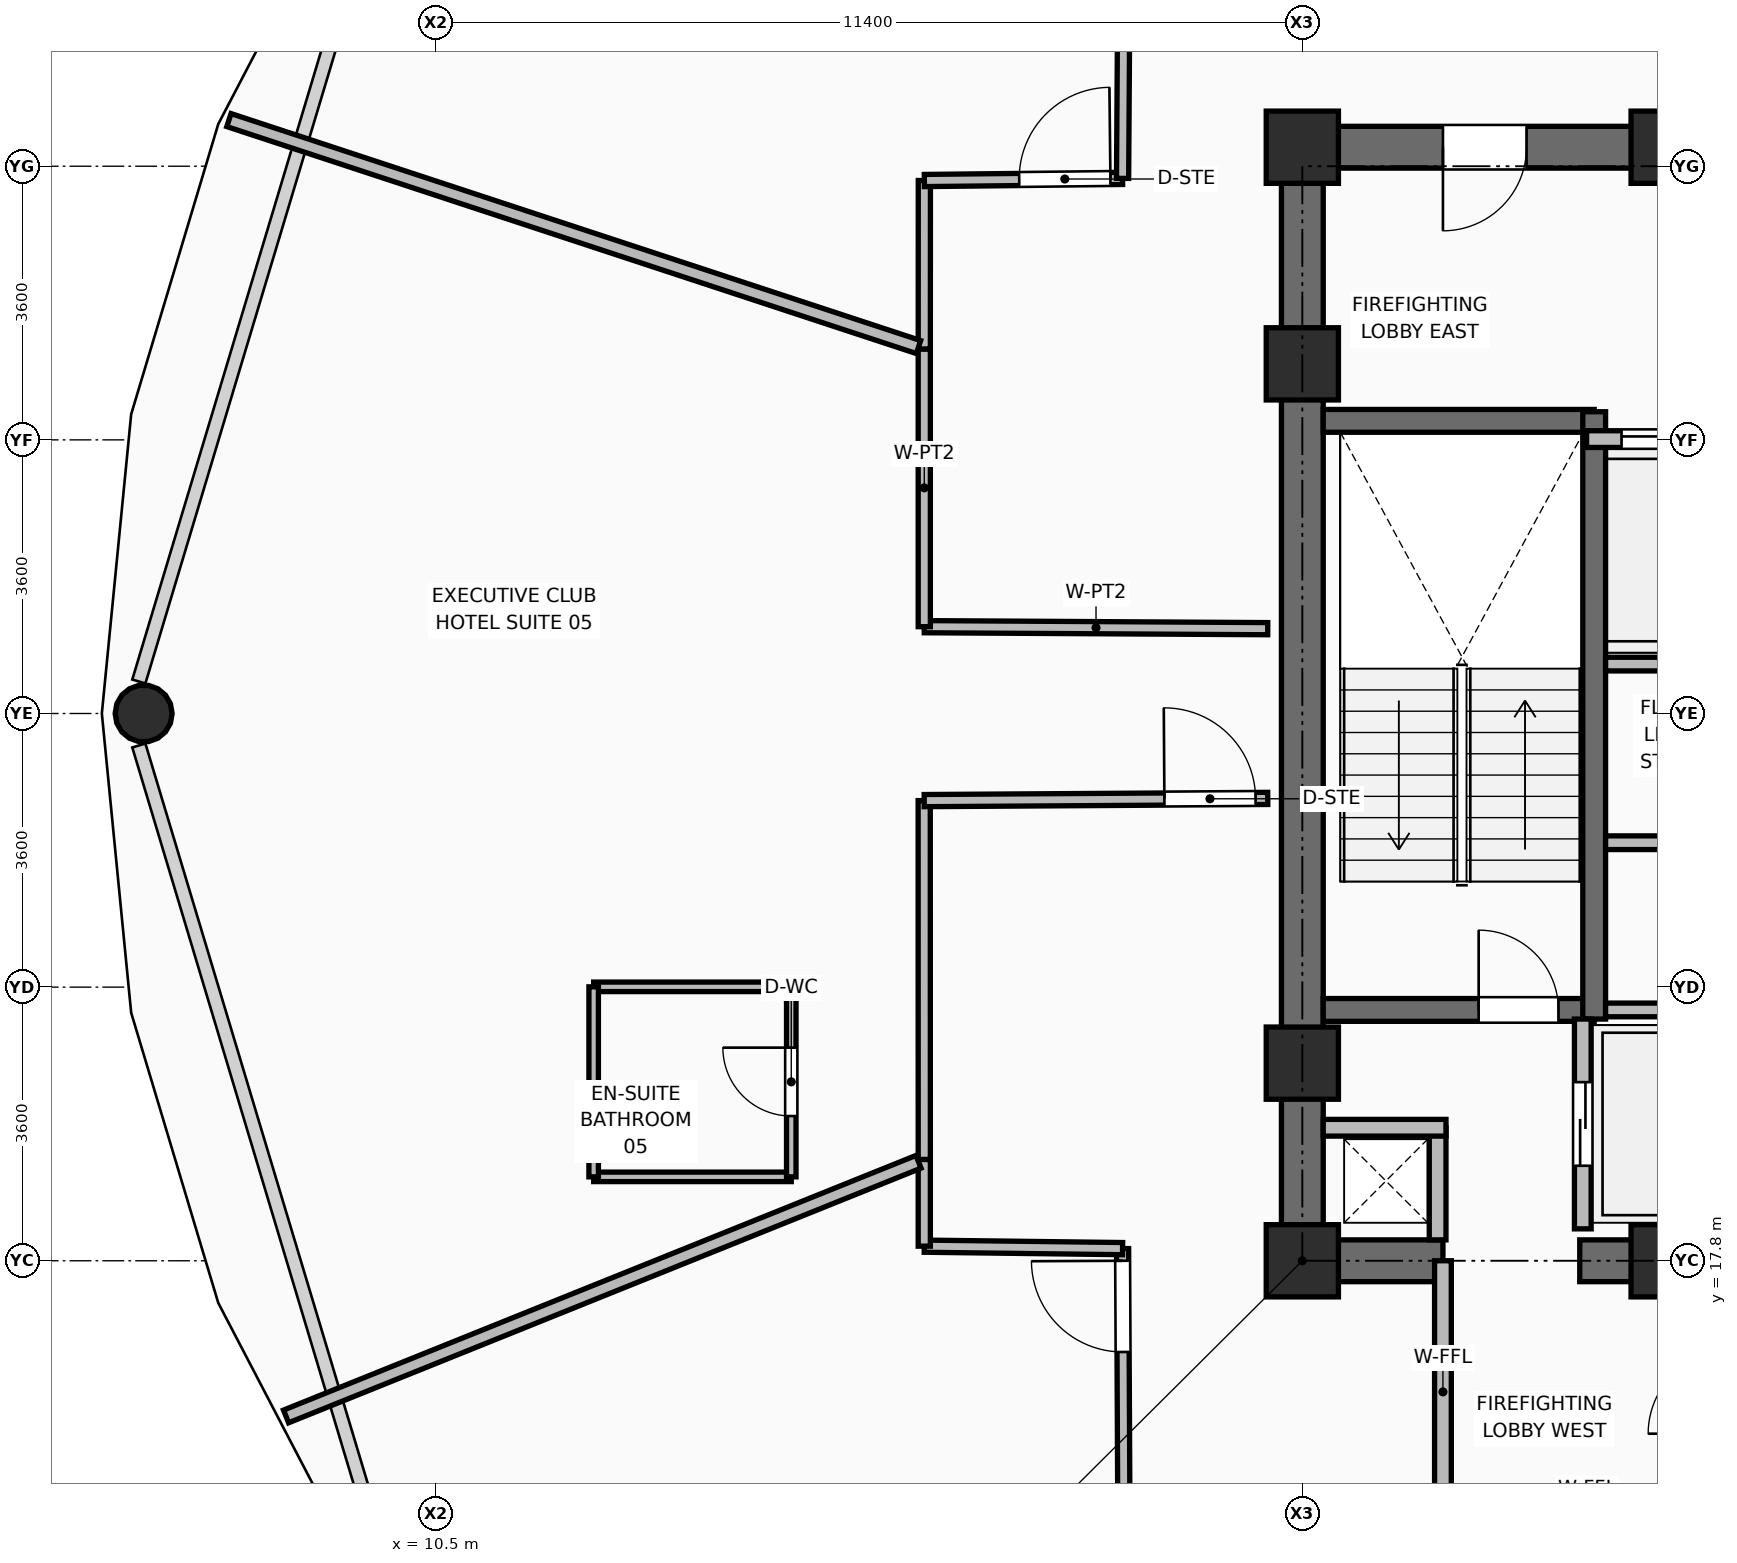
"""IFC4 building model, lengths in metres.
Left out: names, types, materials, properties, quantities, classifications, styles, units other than length and angle.
Written with IfcOpenShell. Run it as: python <this file> out.ifc"""

import sys

from ifc_helpers import new_model, si_unit, direction, frame, frame_2d, origin, origin_2d, place, context, subcontext, project, spatial, rectangle, hollow_circle, extrude, element, fill, save


model = new_model("IFC4")
c1 = context("Model", 3, precision=1e-05, world=origin(), true_north=direction((0.0, 1.0)))
c2 = subcontext(c1, "Body", "Model", "MODEL_VIEW")
j1 = project(units=[si_unit("LENGTHUNIT", "METRE"), si_unit("PLANEANGLEUNIT", "RADIAN")], contexts=[c1])
p1 = place(None, origin())
s1 = spatial("IfcSite", under=j1, at=p1, CompositionType="ELEMENT")
p2 = place(p1, origin())
s2 = spatial("IfcBuilding", under=s1, at=p2, CompositionType="ELEMENT")
p3 = place(p2, frame((0.0, 0.0, 145.95)))
s3 = spatial("IfcBuildingStorey", under=s2, at=p3, CompositionType="ELEMENT", Elevation=145.95)
for number, where, z_axis, x_axis in (
    (1, (21.9, 17.8, 0.0), (0.0, 0.0, 1.0), (1.0, 0.0, 0.0)),
    (2, (26.7, 17.8, 0.0), (0.0, 0.0, 1.0), (1.0, 0.0, 0.0)),
    (3, (21.9, 20.4, 0.0), (0.0, 0.0, 1.0), (1.0, 0.0, 0.0)),
    (4, (21.9, 29.6, 0.0), (0.0, 0.0, 1.0), (1.0, 0.0, 0.0)),
    (5, (21.9, 32.45, 0.0), (0.0, 0.0, 1.0), (1.0, 0.0, 0.0)),
    (6, (26.7, 32.45, 0.0), (0.0, 0.0, 1.0), (1.0, 0.0, 0.0)),
):
    element("IfcColumn", number, at=place(p3, frame(where, z_axis=z_axis, x_axis=x_axis)), inside=s3, PredefinedType="COLUMN", context=c2, shape_type="SweptSolid", body=[
        extrude(rectangle(XDim=0.95, YDim=0.95, at=origin_2d()), origin(), (0.0, 0.0, 1.0), 3.75),
    ])
p4 = place(p3, frame((6.655, 25.0, 0.0), z_axis=(0.017367276966, 0.0, 0.999849177472), x_axis=(0.0, 1.0, 0.0)))
e7 = element("IfcColumn", 7, at=p4, inside=s3, PredefinedType="COLUMN", context=c2, shape_type="SweptSolid", body=[
    extrude(hollow_circle(Radius=0.375, WallThickness=0.035, at=origin_2d()), origin(), (0.0, 0.0, 1.0), 3.571),
])
p5 = place(p3, frame((21.625, 17.8, 0.0), z_axis=(0.0, 0.0, 1.0), x_axis=(1.0, 0.0, 0.0)))
e8 = element("IfcWall", 8, at=p5, inside=s3, PredefinedType="SHEAR", context=c2, shape_type="SweptSolid", body=[
    extrude(rectangle(XDim=2.125, YDim=0.55, at=frame_2d((1.062, 0.0))), origin(), (0.0, 0.0, 1.0), 3.57),
])
p6 = place(p3, frame((25.55, 17.8, 0.0), z_axis=(0.0, 0.0, 1.0), x_axis=(1.0, 0.0, 0.0)))
e9 = element("IfcWall", 9, at=p6, inside=s3, PredefinedType="SHEAR", context=c2, shape_type="SweptSolid", body=[
    extrude(rectangle(XDim=6.9, YDim=0.55, at=frame_2d((3.45, 0.0))), origin(), (0.0, 0.0, 1.0), 3.57),
])
p7 = place(p3, frame((21.625, 32.45, 0.0), z_axis=(0.0, 0.0, 1.0), x_axis=(1.0, 0.0, 0.0)))
e10 = element("IfcWall", 10, at=p7, inside=s3, PredefinedType="SHEAR", context=c2, shape_type="SweptSolid", body=[
    extrude(rectangle(XDim=19.75, YDim=0.55, at=frame_2d((9.875, 0.0))), origin(), (0.0, 0.0, 1.0), 3.57),
])
p8 = place(p7, frame((2.125, 0.0, 0.0)))
e11 = element("IfcOpeningElement", 11, at=p8, cuts=e10, PredefinedType="OPENING", context=c2, shape_type="SweptSolid", body=[
    extrude(rectangle(XDim=1.1, YDim=2.1, at=frame_2d((0.55, 1.05))), frame((0.0, 0.285, 0.0), z_axis=(0.0, -1.0, 0.0), x_axis=(1.0, 0.0, 0.0)), (0.0, 0.0, 1.0), 0.57),
])
p9 = place(p7, frame((15.515, 0.0, 0.0)))
e12 = element("IfcOpeningElement", 12, at=p9, cuts=e10, PredefinedType="OPENING", context=c2, shape_type="SweptSolid", body=[
    extrude(rectangle(XDim=1.0, YDim=2.1, at=frame_2d((0.5, 1.05))), frame((0.0, 0.285, 0.0), z_axis=(0.0, -1.0, 0.0), x_axis=(1.0, 0.0, 0.0)), (0.0, 0.0, 1.0), 0.57),
])
p10 = place(p7, frame((17.525, 0.0, 0.0)))
e13 = element("IfcOpeningElement", 13, at=p10, cuts=e10, PredefinedType="OPENING", context=c2, shape_type="SweptSolid", body=[
    extrude(rectangle(XDim=0.9, YDim=2.1, at=frame_2d((0.45, 1.05))), frame((0.0, 0.285, 0.0), z_axis=(0.0, -1.0, 0.0), x_axis=(1.0, 0.0, 0.0)), (0.0, 0.0, 1.0), 0.57),
])
p11 = place(p3, frame((21.9, 18.075, 0.0), z_axis=(0.0, 0.0, 1.0), x_axis=(0.0, 1.0, 0.0)))
e14 = element("IfcWall", 14, at=p11, inside=s3, PredefinedType="SHEAR", context=c2, shape_type="SweptSolid", body=[
    extrude(rectangle(XDim=14.1, YDim=0.55, at=frame_2d((7.05, 0.0))), origin(), (0.0, 0.0, 1.0), 3.57),
])
p12 = place(p3, frame((22.175, 21.1, 0.0), z_axis=(0.0, 0.0, 1.0), x_axis=(1.0, 0.0, 0.0)))
e15 = element("IfcWall", 15, at=p12, inside=s3, PredefinedType="SHEAR", context=c2, shape_type="SweptSolid", body=[
    extrude(rectangle(XDim=3.565, YDim=0.3, at=frame_2d((1.782, 0.0))), origin(), (0.0, 0.0, 1.0), 3.57),
])
p13 = place(p12, frame((2.045, 0.0, 0.0)))
e16 = element("IfcOpeningElement", 16, at=p13, cuts=e15, PredefinedType="OPENING", context=c2, shape_type="SweptSolid", body=[
    extrude(rectangle(XDim=1.05, YDim=2.1, at=frame_2d((0.525, 1.05))), frame((0.0, 0.16, 0.0), z_axis=(0.0, -1.0, 0.0), x_axis=(1.0, 0.0, 0.0)), (0.0, 0.0, 1.0), 0.32),
])
p14 = place(p3, frame((22.175, 28.85, 0.0), z_axis=(0.0, 0.0, 1.0), x_axis=(1.0, 0.0, 0.0)))
e17 = element("IfcWall", 17, at=p14, inside=s3, PredefinedType="SHEAR", context=c2, shape_type="SweptSolid", body=[
    extrude(rectangle(XDim=3.565, YDim=0.3, at=frame_2d((1.782, 0.0))), origin(), (0.0, 0.0, 1.0), 3.57),
])
p15 = place(p3, frame((25.74, 20.98, 0.0), z_axis=(0.0, 0.0, 1.0), x_axis=(0.0, 1.0, 0.0)))
e18 = element("IfcWall", 18, at=p15, inside=s3, PredefinedType="SHEAR", context=c2, shape_type="SweptSolid", body=[
    extrude(rectangle(XDim=7.99, YDim=0.3, at=frame_2d((3.995, 0.0))), origin(), (0.0, 0.0, 1.0), 3.57),
])
p16 = place(p3, frame((23.68, 18.075, 0.0), z_axis=(0.0, 0.0, 1.0), x_axis=(0.0, 1.0, 0.0)))
e19 = element("IfcWall", 19, at=p16, inside=s3, PredefinedType="PARTITIONING", context=c2, shape_type="SweptSolid", body=[
    extrude(rectangle(XDim=1.475, YDim=0.22, at=frame_2d((0.738, 0.0))), origin(), (0.0, 0.0, 1.0), 3.55),
])
p17 = place(p3, frame((22.175, 19.55, 0.0), z_axis=(0.0, 0.0, 1.0), x_axis=(1.0, 0.0, 0.0)))
e20 = element("IfcWall", 20, at=p17, inside=s3, PredefinedType="PARTITIONING", context=c2, shape_type="SweptSolid", body=[
    extrude(rectangle(XDim=1.615, YDim=0.22, at=frame_2d((0.808, 0.0))), origin(), (0.0, 0.0, 1.0), 2.595),
])
p18 = place(p3, frame((25.59, 18.22, 0.0), z_axis=(0.0, 0.0, 1.0), x_axis=(0.0, 1.0, 0.0)))
e21 = element("IfcWall", 21, at=p18, inside=s3, PredefinedType="PARTITIONING", context=c2, shape_type="SweptSolid", body=[
    extrude(rectangle(XDim=2.76, YDim=0.22, at=frame_2d((1.38, 0.0))), origin(), (0.0, 0.0, 1.0), 3.55),
])
p19 = place(p18, frame((0.83, 0.0, 0.0)))
e22 = element("IfcOpeningElement", 22, at=p19, cuts=e21, PredefinedType="OPENING", context=c2, shape_type="SweptSolid", body=[
    extrude(rectangle(XDim=1.1, YDim=2.2, at=frame_2d((0.55, 1.1))), frame((0.0, 0.12, 0.0), z_axis=(0.0, -1.0, 0.0), x_axis=(1.0, 0.0, 0.0)), (0.0, 0.0, 1.0), 0.24),
])
p20 = place(p3, frame((25.64, 28.61, 0.0), z_axis=(0.0, 0.0, 1.0), x_axis=(1.0, 0.0, 0.0)))
e23 = element("IfcWall", 23, at=p20, inside=s3, PredefinedType="PARTITIONING", context=c2, shape_type="SweptSolid", body=[
    extrude(rectangle(XDim=2.02, YDim=0.22, at=frame_2d((1.01, 0.0))), origin(), (0.0, 0.0, 1.0), 3.55),
])
p21 = place(p20, frame((0.46, 0.0, 0.0)))
e24 = element("IfcOpeningElement", 24, at=p21, cuts=e23, PredefinedType="OPENING", context=c2, shape_type="SweptSolid", body=[
    extrude(rectangle(XDim=1.1, YDim=2.2, at=frame_2d((0.55, 1.1))), frame((0.0, 0.12, 0.0), z_axis=(0.0, -1.0, 0.0), x_axis=(1.0, 0.0, 0.0)), (0.0, 0.0, 1.0), 0.24),
])
for number, where, z_axis, x_axis in (
    (25, (25.89, 21.1, 0.0), (0.0, 0.0, 1.0), (1.0, 0.0, 0.0)),
    (26, (25.89, 25.65, 0.0), (0.0, 0.0, 1.0), (1.0, 0.0, 0.0)),
):
    element("IfcWall", number, at=place(p3, frame(where, z_axis=z_axis, x_axis=x_axis)), inside=s3, PredefinedType="PARTITIONING", context=c2, shape_type="SweptSolid", body=[
        extrude(rectangle(XDim=1.7, YDim=0.18, at=frame_2d((0.85, 0.0))), origin(), (0.0, 0.0, 1.0), 3.55),
    ])
p22 = place(p3, frame((25.89, 23.3, 0.0), z_axis=(0.0, 0.0, 1.0), x_axis=(1.0, 0.0, 0.0)))
e27 = element("IfcWall", 27, at=p22, inside=s3, PredefinedType="PARTITIONING", context=c2, shape_type="SweptSolid", body=[
    extrude(rectangle(XDim=1.79, YDim=0.18, at=frame_2d((0.895, 0.0))), origin(), (0.0, 0.0, 1.0), 3.55),
])
p23 = place(p3, frame((23.75, 14.35, 0.0), z_axis=(0.0, 0.0, 1.0), x_axis=(0.0, 1.0, 0.0)))
e28 = element("IfcWall", 28, at=p23, inside=s3, PredefinedType="PARTITIONING", context=c2, shape_type="SweptSolid", body=[
    extrude(rectangle(XDim=3.45, YDim=0.22, at=frame_2d((1.725, 0.0))), origin(), (0.0, 0.0, 1.0), 3.006),
])
p24 = place(p3, frame((21.445, 26.116, 0.0), z_axis=(0.0, 0.0, 1.0), x_axis=(-0.999983292409, 0.005780562522, 0.0)))
e29 = element("IfcWall", 29, at=p24, inside=s3, PredefinedType="PARTITIONING", context=c2, shape_type="SweptSolid", body=[
    extrude(rectangle(XDim=4.519, YDim=0.16, at=frame_2d((2.26, 0.0))), origin(), (0.0, 0.0, 1.0), 2.595),
])
p25 = place(p3, frame((16.926, 26.142, 0.0), z_axis=(0.0, 0.0, 1.0), x_axis=(0.0, 1.0, 0.0)))
e30 = element("IfcWall", 30, at=p25, inside=s3, PredefinedType="PARTITIONING", context=c2, shape_type="SweptSolid", body=[
    extrude(rectangle(XDim=3.654, YDim=0.16, at=frame_2d((1.827, 0.0))), origin(), (0.0, 0.0, 1.0), 3.55),
])
p26 = place(p3, frame((16.926, 29.796, 0.0), z_axis=(0.0, 0.0, 1.0), x_axis=(0.000440674189, 0.999999902903, 0.0)))
e31 = element("IfcWall", 31, at=p26, inside=s3, PredefinedType="PARTITIONING", context=c2, shape_type="SweptSolid", body=[
    extrude(rectangle(XDim=2.216, YDim=0.16, at=frame_2d((1.108, 0.0))), origin(), (0.0, 0.0, 1.0), 3.55),
])
p27 = place(p3, frame((16.927, 32.012, 0.0), z_axis=(0.0, 0.0, 1.0), x_axis=(0.99994205409, 0.010765150367, 0.0)))
e32 = element("IfcWall", 32, at=p27, inside=s3, PredefinedType="PARTITIONING", context=c2, shape_type="SweptSolid", body=[
    extrude(rectangle(XDim=2.608, YDim=0.16, at=frame_2d((1.304, 0.0))), origin(), (0.0, 0.0, 1.0), 3.55),
])
p28 = place(p27, frame((1.248, 0.0, 0.0)))
e33 = element("IfcOpeningElement", 33, at=p28, cuts=e32, PredefinedType="OPENING", context=c2, shape_type="SweptSolid", body=[
    extrude(rectangle(XDim=1.2, YDim=2.1, at=frame_2d((0.6, 1.05))), frame((0.0, 0.09, 0.0), z_axis=(0.0, -1.0, 0.0), x_axis=(1.0, 0.0, 0.0)), (0.0, 0.0, 1.0), 0.18),
])
p29 = place(p3, frame((19.535, 32.04, 0.0), z_axis=(0.0, 0.0, 1.0), x_axis=(0.006526585281, 0.999978701615, 0.0)))
e34 = element("IfcWall", 34, at=p29, inside=s3, PredefinedType="PARTITIONING", context=c2, shape_type="SweptSolid", body=[
    extrude(rectangle(XDim=2.768, YDim=0.16, at=frame_2d((1.384, 0.0))), origin(), (0.0, 0.0, 1.0), 3.006),
])
p30 = place(p3, frame((19.555, 13.816, 0.0), z_axis=(0.0, 0.0, 1.0), x_axis=(-0.004830861504, 0.99998833132, 0.0)))
e35 = element("IfcWall", 35, at=p30, inside=s3, PredefinedType="PARTITIONING", context=c2, shape_type="SweptSolid", body=[
    extrude(rectangle(XDim=4.144, YDim=0.16, at=frame_2d((2.072, 0.0))), origin(), (0.0, 0.0, 1.0), 3.006),
])
p31 = place(p30, frame((2.784, 0.0, 0.0)))
e36 = element("IfcOpeningElement", 36, at=p31, cuts=e35, PredefinedType="OPENING", context=c2, shape_type="SweptSolid", body=[
    extrude(rectangle(XDim=1.2, YDim=2.1, at=frame_2d((0.6, 1.05))), frame((0.0, 0.09, 0.0), z_axis=(0.0, -1.0, 0.0), x_axis=(1.0, 0.0, 0.0)), (0.0, 0.0, 1.0), 0.18),
])
p32 = place(p3, frame((19.535, 17.96, 0.0), z_axis=(0.0, 0.0, 1.0), x_axis=(-0.999924866554, 0.012258109444, 0.0)))
e37 = element("IfcWall", 37, at=p32, inside=s3, PredefinedType="PARTITIONING", context=c2, shape_type="SweptSolid", body=[
    extrude(rectangle(XDim=2.609, YDim=0.16, at=frame_2d((1.305, 0.0))), origin(), (0.0, 0.0, 1.0), 3.55),
])
p33 = place(p3, frame((16.926, 17.992, 0.0), z_axis=(0.0, 0.0, 1.0), x_axis=(0.0, 1.0, 0.0)))
e38 = element("IfcWall", 38, at=p33, inside=s3, PredefinedType="PARTITIONING", context=c2, shape_type="SweptSolid", body=[
    extrude(rectangle(XDim=1.141, YDim=0.16, at=frame_2d((0.571, 0.0))), origin(), (0.0, 0.0, 1.0), 3.55),
])
p34 = place(p3, frame((16.926, 19.133, 0.0), z_axis=(0.0, 0.0, 1.0), x_axis=(-0.000206857316, 0.999999978605, 0.0)))
e39 = element("IfcWall", 39, at=p34, inside=s3, PredefinedType="PARTITIONING", context=c2, shape_type="SweptSolid", body=[
    extrude(rectangle(XDim=4.721, YDim=0.16, at=frame_2d((2.36, 0.0))), origin(), (0.0, 0.0, 1.0), 3.006),
])
p35 = place(p3, frame((16.925, 23.854, 0.0), z_axis=(0.0, 0.0, 1.0), x_axis=(0.999979343823, 0.006427435558, 0.0)))
e40 = element("IfcWall", 40, at=p35, inside=s3, PredefinedType="PARTITIONING", context=c2, shape_type="SweptSolid", body=[
    extrude(rectangle(XDim=4.52, YDim=0.16, at=frame_2d((2.26, 0.0))), origin(), (0.0, 0.0, 1.0), 2.595),
])
p36 = place(p35, frame((3.16, 0.0, 0.0)))
e41 = element("IfcOpeningElement", 41, at=p36, cuts=e40, PredefinedType="OPENING", context=c2, shape_type="SweptSolid", body=[
    extrude(rectangle(XDim=1.2, YDim=2.1, at=frame_2d((0.6, 1.05))), frame((0.0, 0.09, 0.0), z_axis=(0.0, -1.0, 0.0), x_axis=(1.0, 0.0, 0.0)), (0.0, 0.0, 1.0), 0.18),
])
p37 = place(p3, frame((16.85, 29.821, 0.0), z_axis=(0.0, 0.0, 1.0), x_axis=(-0.949885351633, 0.312598494483, 0.0)))
e42 = element("IfcWall", 42, at=p37, inside=s3, PredefinedType="PARTITIONING", context=c2, shape_type="SweptSolid", body=[
    extrude(rectangle(XDim=9.552, YDim=0.18, at=frame_2d((4.776, 0.0))), origin(), (0.0, 0.0, 1.0), 2.852),
])
p38 = place(p3, frame((16.85, 19.102, 0.0), z_axis=(0.0, 0.0, 1.0), x_axis=(-0.927640946313, -0.373473258378, 0.0)))
e43 = element("IfcWall", 43, at=p38, inside=s3, PredefinedType="PARTITIONING", context=c2, shape_type="SweptSolid", body=[
    extrude(rectangle(XDim=8.97, YDim=0.18, at=frame_2d((4.485, 0.0))), origin(), (0.0, 0.0, 1.0), 2.852),
])
for number, where, z_axis, x_axis in (
    (44, (12.576, 18.904, 0.0), (0.0, 0.0, 1.0), (1.0, 0.0, 0.0)),
    (45, (12.576, 21.404, 0.0), (0.0, 0.0, 1.0), (1.0, 0.0, 0.0)),
):
    element("IfcWall", number, at=place(p3, frame(where, z_axis=z_axis, x_axis=x_axis)), inside=s3, PredefinedType="PARTITIONING", context=c2, shape_type="SweptSolid", body=[
        extrude(rectangle(XDim=2.6, YDim=0.125, at=frame_2d((1.3, 0.0))), origin(), (0.0, 0.0, 1.0), 3.55),
    ])
p39 = place(p3, frame((12.576, 18.904, 0.0), z_axis=(0.0, 0.0, 1.0), x_axis=(0.0, 1.0, 0.0)))
e46 = element("IfcWall", 46, at=p39, inside=s3, PredefinedType="PARTITIONING", context=c2, shape_type="SweptSolid", body=[
    extrude(rectangle(XDim=2.5, YDim=0.125, at=frame_2d((1.25, 0.0))), origin(), (0.0, 0.0, 1.0), 3.55),
])
p40 = place(p3, frame((15.176, 18.904, 0.0), z_axis=(0.0, 0.0, 1.0), x_axis=(0.0, 1.0, 0.0)))
e47 = element("IfcWall", 47, at=p40, inside=s3, PredefinedType="PARTITIONING", context=c2, shape_type="SweptSolid", body=[
    extrude(rectangle(XDim=2.5, YDim=0.125, at=frame_2d((1.25, 0.0))), origin(), (0.0, 0.0, 1.0), 3.55),
])
p41 = place(p40, frame((0.8, 0.0, 0.0)))
e48 = element("IfcOpeningElement", 48, at=p41, cuts=e47, PredefinedType="OPENING", context=c2, shape_type="SweptSolid", body=[
    extrude(rectangle(XDim=0.9, YDim=2.1, at=frame_2d((0.45, 1.05))), frame((0.0, 0.073, 0.0), z_axis=(0.0, -1.0, 0.0), x_axis=(1.0, 0.0, 0.0)), (0.0, 0.0, 1.0), 0.145),
])
p42 = place(p13, origin())
e49 = element("IfcDoor", 49, at=p42, inside=s3, OperationType="SINGLE_SWING_LEFT", PredefinedType="DOOR", context=c2, shape_type="SweptSolid", body=[
    extrude(rectangle(XDim=1.05, YDim=2.1, at=frame_2d((0.525, 1.05))), frame((0.0, 0.025, 0.0), z_axis=(0.0, -1.0, 0.0), x_axis=(1.0, 0.0, 0.0)), (0.0, 0.0, 1.0), 0.05),
])
fill(e16, e49)
p43 = place(p19, origin())
e50 = element("IfcDoor", 50, at=p43, inside=s3, OperationType="DOUBLE_DOOR_SLIDING", PredefinedType="DOOR", context=c2, shape_type="SweptSolid", body=[
    extrude(rectangle(XDim=1.1, YDim=2.2, at=frame_2d((0.55, 1.1))), frame((0.0, 0.025, 0.0), z_axis=(0.0, -1.0, 0.0), x_axis=(1.0, 0.0, 0.0)), (0.0, 0.0, 1.0), 0.05),
])
fill(e22, e50)
p44 = place(p21, origin())
e51 = element("IfcDoor", 51, at=p44, inside=s3, OperationType="DOUBLE_DOOR_SLIDING", PredefinedType="DOOR", context=c2, shape_type="SweptSolid", body=[
    extrude(rectangle(XDim=1.1, YDim=2.2, at=frame_2d((0.55, 1.1))), frame((0.0, 0.025, 0.0), z_axis=(0.0, -1.0, 0.0), x_axis=(1.0, 0.0, 0.0)), (0.0, 0.0, 1.0), 0.05),
])
fill(e24, e51)
p45 = place(p8, frame((1.1, 0.0, 0.0), z_axis=(0.0, 0.0, 1.0), x_axis=(-1.0, 0.0, 0.0)))
e52 = element("IfcDoor", 52, at=p45, inside=s3, OperationType="SINGLE_SWING_RIGHT", PredefinedType="DOOR", context=c2, shape_type="SweptSolid", body=[
    extrude(rectangle(XDim=1.1, YDim=2.1, at=frame_2d((0.55, 1.05))), frame((0.0, 0.025, 0.0), z_axis=(0.0, -1.0, 0.0), x_axis=(1.0, 0.0, 0.0)), (0.0, 0.0, 1.0), 0.05),
])
fill(e11, e52)
p46 = place(p28, origin())
e53 = element("IfcDoor", 53, at=p46, inside=s3, OperationType="SINGLE_SWING_RIGHT", PredefinedType="DOOR", context=c2, shape_type="SweptSolid", body=[
    extrude(rectangle(XDim=1.2, YDim=2.1, at=frame_2d((0.6, 1.05))), frame((0.0, 0.025, 0.0), z_axis=(0.0, -1.0, 0.0), x_axis=(1.0, 0.0, 0.0)), (0.0, 0.0, 1.0), 0.05),
])
fill(e33, e53)
p47 = place(p41, origin())
e54 = element("IfcDoor", 54, at=p47, inside=s3, OperationType="SINGLE_SWING_RIGHT", PredefinedType="DOOR", context=c2, shape_type="SweptSolid", body=[
    extrude(rectangle(XDim=0.9, YDim=2.1, at=frame_2d((0.45, 1.05))), frame((0.0, 0.025, 0.0), z_axis=(0.0, -1.0, 0.0), x_axis=(1.0, 0.0, 0.0)), (0.0, 0.0, 1.0), 0.05),
])
fill(e48, e54)
p48 = place(p36, origin())
e55 = element("IfcDoor", 55, at=p48, inside=s3, OperationType="SINGLE_SWING_LEFT", PredefinedType="DOOR", context=c2, shape_type="SweptSolid", body=[
    extrude(rectangle(XDim=1.2, YDim=2.1, at=frame_2d((0.6, 1.05))), frame((0.0, 0.025, 0.0), z_axis=(0.0, -1.0, 0.0), x_axis=(1.0, 0.0, 0.0)), (0.0, 0.0, 1.0), 0.05),
])
fill(e41, e55)
p49 = place(p31, origin())
e56 = element("IfcDoor", 56, at=p49, inside=s3, OperationType="SINGLE_SWING_RIGHT", PredefinedType="DOOR", context=c2, shape_type="SweptSolid", body=[
    extrude(rectangle(XDim=1.2, YDim=2.1, at=frame_2d((0.6, 1.05))), frame((0.0, 0.025, 0.0), z_axis=(0.0, -1.0, 0.0), x_axis=(1.0, 0.0, 0.0)), (0.0, 0.0, 1.0), 0.05),
])
fill(e36, e56)
save(model, sys.argv[1])
